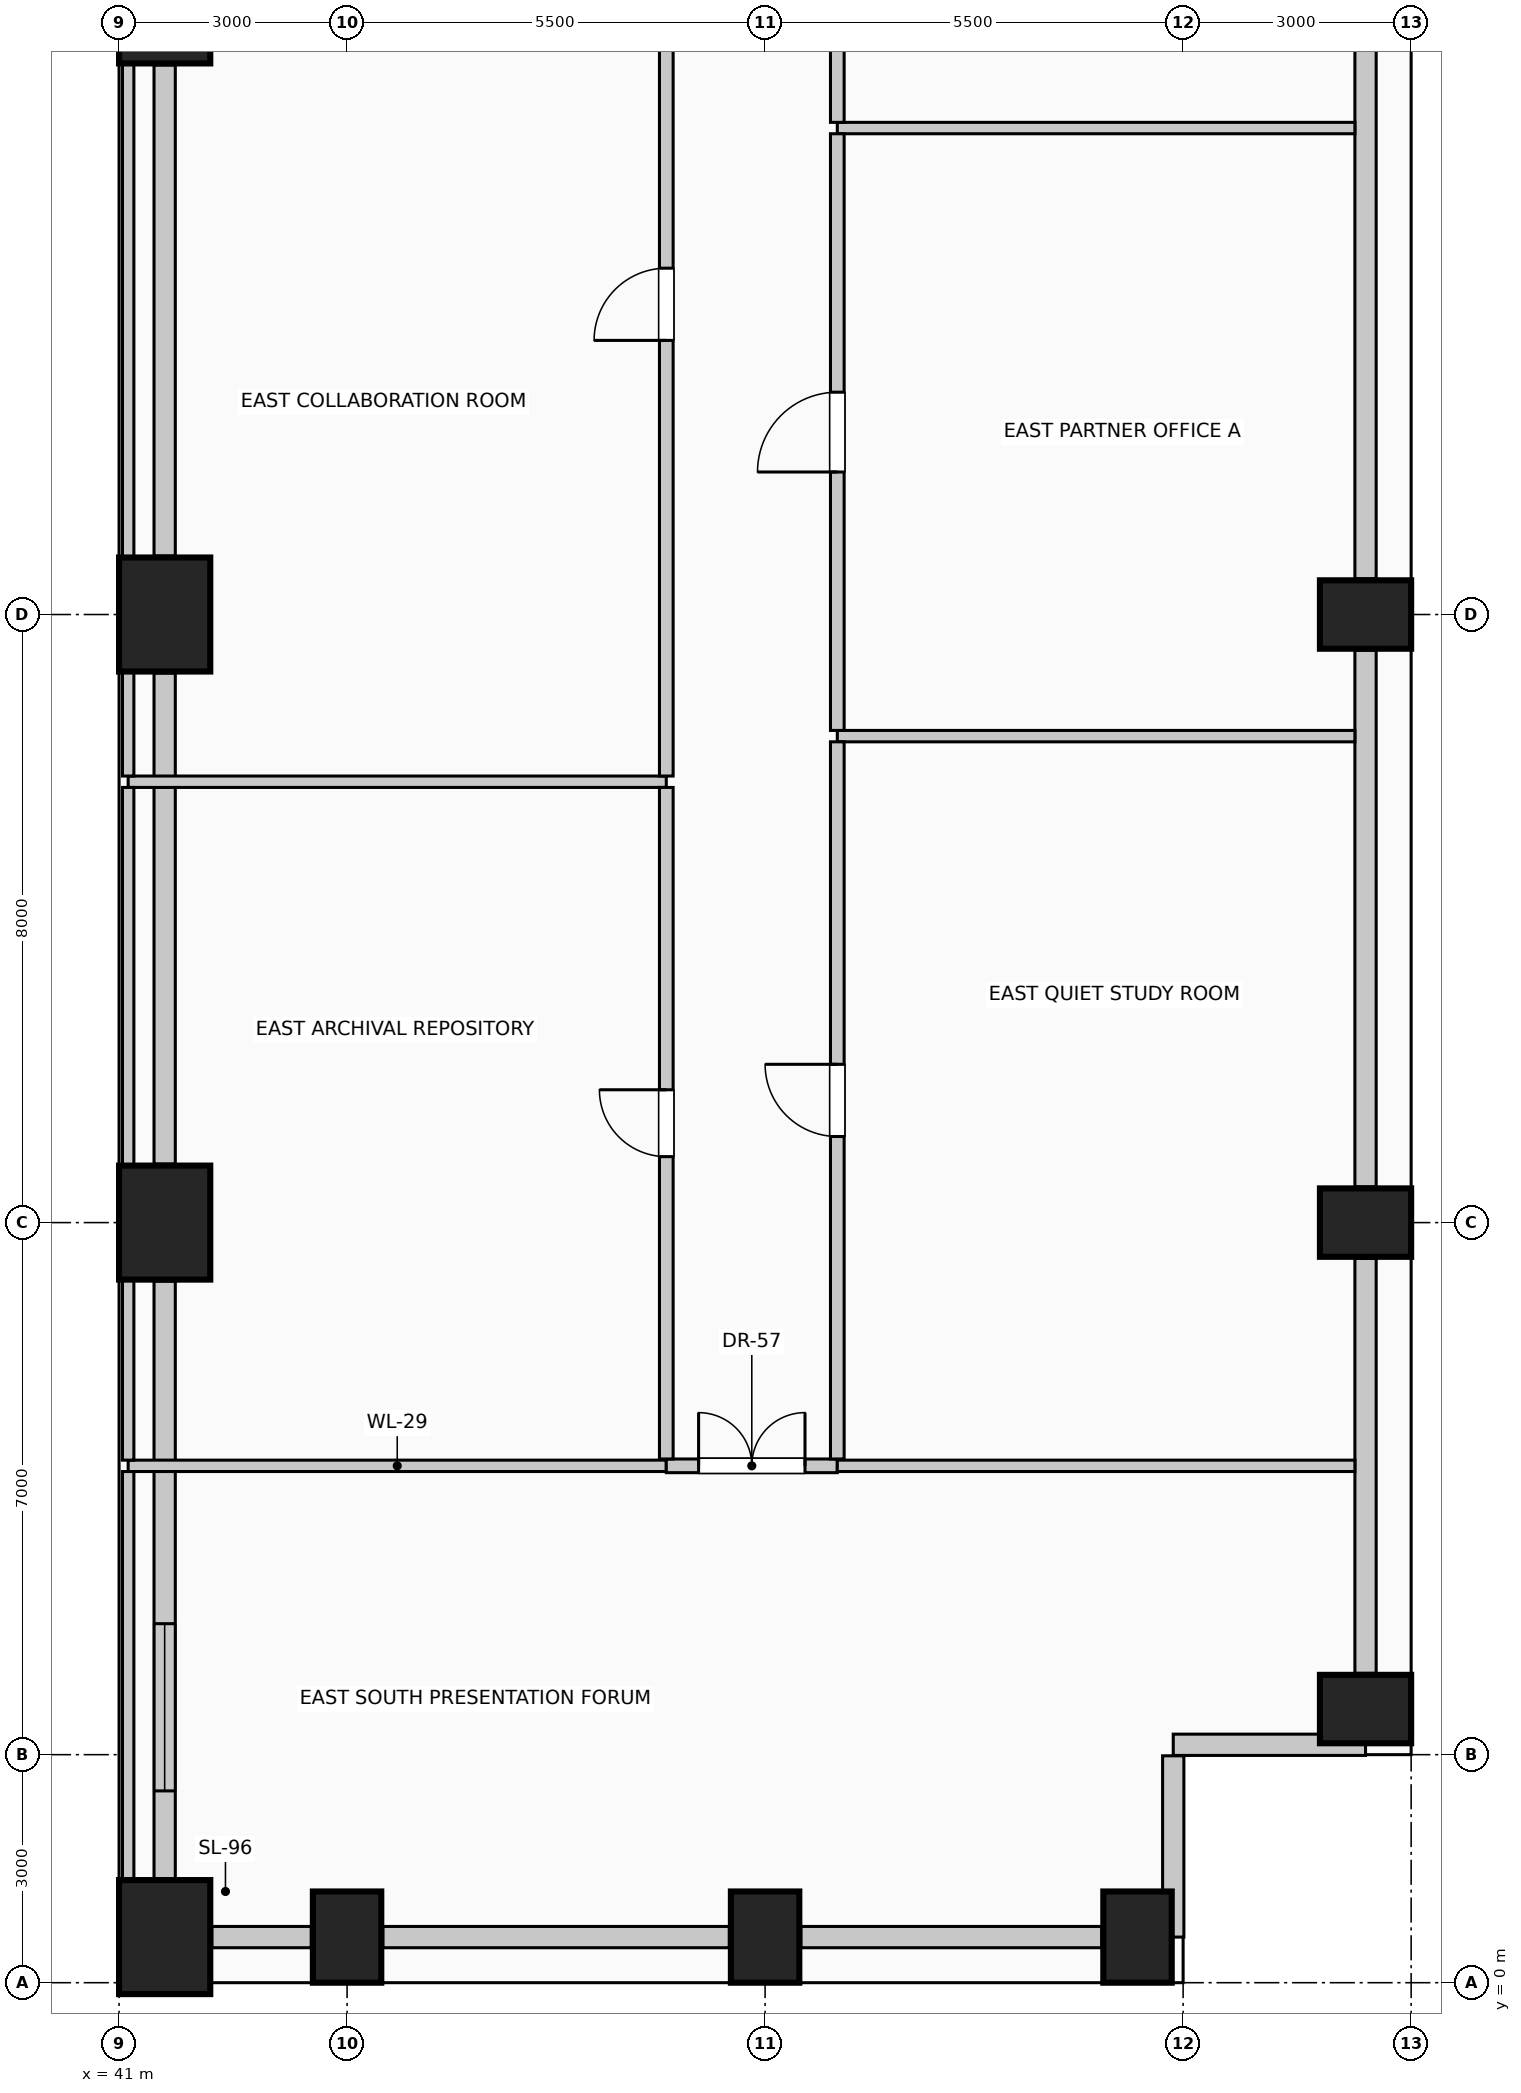
"""IFC4 building model, lengths in metres.
Left out: names, types, materials, properties, quantities, classifications, styles, units other than length and angle.
Written with IfcOpenShell. Run it as: python <this file> out.ifc"""

import sys

from ifc_helpers import new_model, si_unit, direction, frame, frame_2d, origin, origin_2d, place, context, subcontext, project, spatial, rectangle, extrude, element, fill, save


model = new_model("IFC4")
c1 = context("Model", 3, precision=1e-05, world=origin(), true_north=direction((0.0, 1.0)))
c2 = subcontext(c1, "Body", "Model", "MODEL_VIEW")
j1 = project(units=[si_unit("LENGTHUNIT", "METRE"), si_unit("PLANEANGLEUNIT", "RADIAN")], contexts=[c1])
p1 = place(None, origin())
s1 = spatial("IfcSite", under=j1, at=p1, CompositionType="ELEMENT")
p2 = place(p1, origin())
s2 = spatial("IfcBuilding", under=s1, at=p2, CompositionType="ELEMENT")
p3 = place(p2, frame((0.0, 0.0, 34.6)))
s3 = spatial("IfcBuildingStorey", under=s2, at=p3, CompositionType="ELEMENT", Elevation=34.6)
p4 = place(p3, frame((41.6, 0.6, 0.0), z_axis=(0.0, 0.0, 1.0), x_axis=(1.0, 0.0, 0.0)))
e1 = element("IfcColumn", 1, at=p4, inside=s3, PredefinedType="COLUMN", context=c2, shape_type="SweptSolid", body=[
    extrude(rectangle(XDim=1.2, YDim=1.5, at=origin_2d()), origin(), (0.0, 0.0, 1.0), 4.0),
])
for number, where, z_axis, x_axis in (
    (2, (44.0, 0.6, 0.0), (0.0, 0.0, 1.0), (1.0, 0.0, 0.0)),
    (3, (49.5, 0.6, 0.0), (0.0, 0.0, 1.0), (1.0, 0.0, 0.0)),
    (4, (54.4, 0.6, 0.0), (0.0, 0.0, 1.0), (1.0, 0.0, 0.0)),
    (5, (57.4, 3.6, 0.0), (0.0, 0.0, 1.0), (0.0, 1.0, 0.0)),
    (6, (57.4, 10.0, 0.0), (0.0, 0.0, 1.0), (0.0, 1.0, 0.0)),
    (7, (57.4, 18.0, 0.0), (0.0, 0.0, 1.0), (0.0, 1.0, 0.0)),
):
    element("IfcColumn", number, at=place(p3, frame(where, z_axis=z_axis, x_axis=x_axis)), inside=s3, PredefinedType="COLUMN", context=c2, shape_type="SweptSolid", body=[
        extrude(rectangle(XDim=0.9, YDim=1.2, at=origin_2d()), origin(), (0.0, 0.0, 1.0), 4.0),
    ])
for number, where, z_axis, x_axis in (
    (8, (41.6, 10.0, 0.0), (0.0, 0.0, 1.0), (1.0, 0.0, 0.0)),
    (9, (41.6, 18.0, 0.0), (0.0, 0.0, 1.0), (1.0, 0.0, 0.0)),
    (10, (41.6, 26.0, 0.0), (0.0, 0.0, 1.0), (1.0, 0.0, 0.0)),
):
    element("IfcColumn", number, at=place(p3, frame(where, z_axis=z_axis, x_axis=x_axis)), inside=s3, PredefinedType="COLUMN", context=c2, shape_type="SweptSolid", body=[
        extrude(rectangle(XDim=1.2, YDim=1.5, at=origin_2d()), origin(), (0.0, 0.0, 1.0), 4.0),
    ])
p5 = place(p3, frame((43.53, 0.6, 0.0), z_axis=(0.0, 0.0, 1.0), x_axis=(-1.0, 0.0, 0.0)))
e11 = element("IfcWall", 11, at=p5, inside=s3, PredefinedType="SOLIDWALL", context=c2, shape_type="SweptSolid", body=[
    extrude(rectangle(XDim=1.31, YDim=0.28, at=frame_2d((0.655, 0.0))), origin(), (0.0, 0.0, 1.0), 2.85),
])
p6 = place(p3, frame((49.03, 0.6, 0.0), z_axis=(0.0, 0.0, 1.0), x_axis=(-1.0, 0.0, 0.0)))
e12 = element("IfcWall", 12, at=p6, inside=s3, PredefinedType="SOLIDWALL", context=c2, shape_type="SweptSolid", body=[
    extrude(rectangle(XDim=4.56, YDim=0.28, at=frame_2d((2.28, 0.0))), origin(), (0.0, 0.0, 1.0), 2.85),
])
p7 = place(p3, frame((53.93, 0.6, 0.0), z_axis=(0.0, 0.0, 1.0), x_axis=(-1.0, 0.0, 0.0)))
e13 = element("IfcWall", 13, at=p7, inside=s3, PredefinedType="SOLIDWALL", context=c2, shape_type="SweptSolid", body=[
    extrude(rectangle(XDim=3.96, YDim=0.28, at=frame_2d((1.98, 0.0))), origin(), (0.0, 0.0, 1.0), 2.85),
])
p8 = place(p3, frame((57.4, 9.53, 0.0), z_axis=(0.0, 0.0, 1.0), x_axis=(0.0, -1.0, 0.0)))
e14 = element("IfcWall", 14, at=p8, inside=s3, PredefinedType="SOLIDWALL", context=c2, shape_type="SweptSolid", body=[
    extrude(rectangle(XDim=5.46, YDim=0.28, at=frame_2d((2.73, 0.0))), origin(), (0.0, 0.0, 1.0), 2.85),
])
for number, where, z_axis, x_axis in (
    (15, (57.4, 17.53, 0.0), (0.0, 0.0, 1.0), (0.0, -1.0, 0.0)),
    (16, (57.4, 25.53, 0.0), (0.0, 0.0, 1.0), (0.0, -1.0, 0.0)),
):
    element("IfcWall", number, at=place(p3, frame(where, z_axis=z_axis, x_axis=x_axis)), inside=s3, PredefinedType="SOLIDWALL", context=c2, shape_type="SweptSolid", body=[
        extrude(rectangle(XDim=7.06, YDim=0.28, at=frame_2d((3.53, 0.0))), origin(), (0.0, 0.0, 1.0), 2.85),
    ])
p9 = place(p3, frame((57.4, 3.13, 0.0), z_axis=(0.0, 0.0, 1.0), x_axis=(-1.0, 0.0, 0.0)))
e17 = element("IfcWall", 17, at=p9, inside=s3, PredefinedType="SOLIDWALL", context=c2, shape_type="SweptSolid", body=[
    extrude(rectangle(XDim=2.53, YDim=0.28, at=frame_2d((1.265, 0.0))), origin(), (0.0, 0.0, 1.0), 3.7),
])
p10 = place(p3, frame((54.87, 2.985, 0.0), z_axis=(0.0, 0.0, 1.0), x_axis=(0.0, -1.0, 0.0)))
e18 = element("IfcWall", 18, at=p10, inside=s3, PredefinedType="SOLIDWALL", context=c2, shape_type="SweptSolid", body=[
    extrude(rectangle(XDim=2.385, YDim=0.28, at=frame_2d((1.192, 0.0))), origin(), (0.0, 0.0, 1.0), 3.7),
])
p11 = place(p3, frame((41.6, 1.37, 0.0), z_axis=(0.0, 0.0, 1.0), x_axis=(0.0, 1.0, 0.0)))
e19 = element("IfcWall", 19, at=p11, inside=s3, PredefinedType="SOLIDWALL", context=c2, shape_type="SweptSolid", body=[
    extrude(rectangle(XDim=7.86, YDim=0.28, at=frame_2d((3.93, 0.0))), origin(), (0.0, 0.0, 1.0), 3.0),
])
p12 = place(p11, frame((1.153, 0.0, 0.42)))
e20 = element("IfcOpeningElement", 20, at=p12, cuts=e19, PredefinedType="OPENING", context=c2, shape_type="SweptSolid", body=[
    extrude(rectangle(XDim=2.2, YDim=1.95, at=frame_2d((1.1, 0.975))), frame((0.0, 0.15, 0.0), z_axis=(0.0, -1.0, 0.0), x_axis=(1.0, 0.0, 0.0)), (0.0, 0.0, 1.0), 0.3),
])
for number, where, z_axis, x_axis in (
    (21, (41.6, 10.77, 0.0), (0.0, 0.0, 1.0), (0.0, 1.0, 0.0)),
    (22, (41.6, 18.77, 0.0), (0.0, 0.0, 1.0), (0.0, 1.0, 0.0)),
):
    element("IfcWall", number, at=place(p3, frame(where, z_axis=z_axis, x_axis=x_axis)), inside=s3, PredefinedType="SOLIDWALL", context=c2, shape_type="SweptSolid", body=[
        extrude(rectangle(XDim=6.46, YDim=0.28, at=frame_2d((3.23, 0.0))), origin(), (0.0, 0.0, 1.0), 3.0),
    ])
p13 = place(p3, frame((41.12, 6.8, 0.0), z_axis=(0.0, 0.0, 1.0), x_axis=(1.0, 0.0, 0.0)))
e23 = element("IfcWall", 23, at=p13, inside=s3, PredefinedType="PARTITIONING", context=c2, shape_type="SweptSolid", body=[
    extrude(rectangle(XDim=7.08, YDim=0.15, at=frame_2d((3.54, 0.0))), origin(), (0.0, 0.0, 1.0), 3.095),
])
p14 = place(p3, frame((48.2, 6.8, 0.0), z_axis=(0.0, 0.0, 1.0), x_axis=(1.0, 0.0, 0.0)))
e24 = element("IfcWall", 24, at=p14, inside=s3, PredefinedType="PARTITIONING", context=c2, shape_type="SweptSolid", body=[
    extrude(rectangle(XDim=2.25, YDim=0.18, at=frame_2d((1.125, 0.0))), origin(), (0.0, 0.0, 1.0), 3.095),
])
p15 = place(p14, frame((0.425, 0.0, 0.0)))
e25 = element("IfcOpeningElement", 25, at=p15, cuts=e24, PredefinedType="OPENING", context=c2, shape_type="SweptSolid", body=[
    extrude(rectangle(XDim=1.4, YDim=2.2, at=frame_2d((0.7, 1.1))), frame((0.0, 0.1, 0.0), z_axis=(0.0, -1.0, 0.0), x_axis=(1.0, 0.0, 0.0)), (0.0, 0.0, 1.0), 0.2),
])
p16 = place(p3, frame((50.45, 6.8, 0.0), z_axis=(0.0, 0.0, 1.0), x_axis=(1.0, 0.0, 0.0)))
e26 = element("IfcWall", 26, at=p16, inside=s3, PredefinedType="PARTITIONING", context=c2, shape_type="SweptSolid", body=[
    extrude(rectangle(XDim=6.81, YDim=0.15, at=frame_2d((3.405, 0.0))), origin(), (0.0, 0.0, 1.0), 3.095),
])
p17 = place(p3, frame((41.12, 15.8, 0.0), z_axis=(0.0, 0.0, 1.0), x_axis=(1.0, 0.0, 0.0)))
e27 = element("IfcWall", 27, at=p17, inside=s3, PredefinedType="PARTITIONING", context=c2, shape_type="SweptSolid", body=[
    extrude(rectangle(XDim=7.08, YDim=0.15, at=frame_2d((3.54, 0.0))), origin(), (0.0, 0.0, 1.0), 3.7),
])
for number, where, z_axis, x_axis in (
    (28, (50.45, 16.4, 0.0), (0.0, 0.0, 1.0), (1.0, 0.0, 0.0)),
    (29, (50.45, 24.4, 0.0), (0.0, 0.0, 1.0), (1.0, 0.0, 0.0)),
):
    element("IfcWall", number, at=place(p3, frame(where, z_axis=z_axis, x_axis=x_axis)), inside=s3, PredefinedType="PARTITIONING", context=c2, shape_type="SweptSolid", body=[
        extrude(rectangle(XDim=6.81, YDim=0.15, at=frame_2d((3.405, 0.0))), origin(), (0.0, 0.0, 1.0), 3.7),
    ])
p18 = place(p3, frame((41.12, 1.35, 0.0), z_axis=(0.0, 0.0, 1.0), x_axis=(0.0, 1.0, 0.0)))
e30 = element("IfcWall", 30, at=p18, inside=s3, PredefinedType="PARTITIONING", context=c2, shape_type="SweptSolid", body=[
    extrude(rectangle(XDim=5.375, YDim=0.15, at=frame_2d((2.688, 0.0))), origin(), (0.0, 0.0, 1.0), 3.7),
])
p19 = place(p3, frame((41.12, 6.875, 0.0), z_axis=(0.0, 0.0, 1.0), x_axis=(0.0, 1.0, 0.0)))
e31 = element("IfcWall", 31, at=p19, inside=s3, PredefinedType="PARTITIONING", context=c2, shape_type="SweptSolid", body=[
    extrude(rectangle(XDim=2.375, YDim=0.15, at=frame_2d((1.188, 0.0))), origin(), (0.0, 0.0, 1.0), 3.7),
])
p20 = place(p3, frame((41.12, 10.75, 0.0), z_axis=(0.0, 0.0, 1.0), x_axis=(0.0, 1.0, 0.0)))
e32 = element("IfcWall", 32, at=p20, inside=s3, PredefinedType="PARTITIONING", context=c2, shape_type="SweptSolid", body=[
    extrude(rectangle(XDim=4.975, YDim=0.15, at=frame_2d((2.488, 0.0))), origin(), (0.0, 0.0, 1.0), 3.7),
])
p21 = place(p3, frame((41.12, 15.875, 0.0), z_axis=(0.0, 0.0, 1.0), x_axis=(0.0, 1.0, 0.0)))
e33 = element("IfcWall", 33, at=p21, inside=s3, PredefinedType="PARTITIONING", context=c2, shape_type="SweptSolid", body=[
    extrude(rectangle(XDim=1.375, YDim=0.15, at=frame_2d((0.688, 0.0))), origin(), (0.0, 0.0, 1.0), 3.7),
])
p22 = place(p3, frame((41.12, 18.75, 0.0), z_axis=(0.0, 0.0, 1.0), x_axis=(0.0, 1.0, 0.0)))
e34 = element("IfcWall", 34, at=p22, inside=s3, PredefinedType="PARTITIONING", context=c2, shape_type="SweptSolid", body=[
    extrude(rectangle(XDim=6.5, YDim=0.15, at=frame_2d((3.25, 0.0))), origin(), (0.0, 0.0, 1.0), 3.7),
])
p23 = place(p3, frame((48.2, 6.89, 0.0), z_axis=(0.0, 0.0, 1.0), x_axis=(0.0, 1.0, 0.0)))
e35 = element("IfcWall", 35, at=p23, inside=s3, PredefinedType="PARTITIONING", context=c2, shape_type="SweptSolid", body=[
    extrude(rectangle(XDim=8.835, YDim=0.18, at=frame_2d((4.417, 0.0))), origin(), (0.0, 0.0, 1.0), 3.7),
])
p24 = place(p23, frame((3.978, 0.0, 0.0)))
e36 = element("IfcOpeningElement", 36, at=p24, cuts=e35, PredefinedType="OPENING", context=c2, shape_type="SweptSolid", body=[
    extrude(rectangle(XDim=0.88, YDim=2.1, at=frame_2d((0.44, 1.05))), frame((0.0, 0.1, 0.0), z_axis=(0.0, -1.0, 0.0), x_axis=(1.0, 0.0, 0.0)), (0.0, 0.0, 1.0), 0.2),
])
p25 = place(p3, frame((48.2, 15.875, 0.0), z_axis=(0.0, 0.0, 1.0), x_axis=(0.0, 1.0, 0.0)))
e37 = element("IfcWall", 37, at=p25, inside=s3, PredefinedType="PARTITIONING", context=c2, shape_type="SweptSolid", body=[
    extrude(rectangle(XDim=12.413, YDim=0.18, at=frame_2d((6.206, 0.0))), origin(), (0.0, 0.0, 1.0), 3.7),
])
p26 = place(p25, frame((5.731, 0.0, 0.0)))
e38 = element("IfcOpeningElement", 38, at=p26, cuts=e37, PredefinedType="OPENING", context=c2, shape_type="SweptSolid", body=[
    extrude(rectangle(XDim=0.95, YDim=2.15, at=frame_2d((0.475, 1.075))), frame((0.0, 0.1, 0.0), z_axis=(0.0, -1.0, 0.0), x_axis=(1.0, 0.0, 0.0)), (0.0, 0.0, 1.0), 0.2),
])
p27 = place(p3, frame((50.45, 6.89, 0.0), z_axis=(0.0, 0.0, 1.0), x_axis=(0.0, 1.0, 0.0)))
e39 = element("IfcWall", 39, at=p27, inside=s3, PredefinedType="PARTITIONING", context=c2, shape_type="SweptSolid", body=[
    extrude(rectangle(XDim=9.435, YDim=0.18, at=frame_2d((4.718, 0.0))), origin(), (0.0, 0.0, 1.0), 3.7),
])
p28 = place(p27, frame((4.242, 0.0, 0.0)))
e40 = element("IfcOpeningElement", 40, at=p28, cuts=e39, PredefinedType="OPENING", context=c2, shape_type="SweptSolid", body=[
    extrude(rectangle(XDim=0.95, YDim=2.15, at=frame_2d((0.475, 1.075))), frame((0.0, 0.1, 0.0), z_axis=(0.0, -1.0, 0.0), x_axis=(1.0, 0.0, 0.0)), (0.0, 0.0, 1.0), 0.2),
])
p29 = place(p3, frame((50.45, 16.475, 0.0), z_axis=(0.0, 0.0, 1.0), x_axis=(0.0, 1.0, 0.0)))
e41 = element("IfcWall", 41, at=p29, inside=s3, PredefinedType="PARTITIONING", context=c2, shape_type="SweptSolid", body=[
    extrude(rectangle(XDim=7.85, YDim=0.18, at=frame_2d((3.925, 0.0))), origin(), (0.0, 0.0, 1.0), 3.7),
])
p30 = place(p29, frame((3.4, 0.0, 0.0)))
e42 = element("IfcOpeningElement", 42, at=p30, cuts=e41, PredefinedType="OPENING", context=c2, shape_type="SweptSolid", body=[
    extrude(rectangle(XDim=1.05, YDim=2.15, at=frame_2d((0.525, 1.075))), frame((0.0, 0.1, 0.0), z_axis=(0.0, -1.0, 0.0), x_axis=(1.0, 0.0, 0.0)), (0.0, 0.0, 1.0), 0.2),
])
p31 = place(p3, frame((50.45, 24.475, 0.0), z_axis=(0.0, 0.0, 1.0), x_axis=(0.0, 1.0, 0.0)))
e43 = element("IfcWall", 43, at=p31, inside=s3, PredefinedType="PARTITIONING", context=c2, shape_type="SweptSolid", body=[
    extrude(rectangle(XDim=7.8, YDim=0.18, at=frame_2d((3.9, 0.0))), origin(), (0.0, 0.0, 1.0), 3.7),
])
p32 = place(p12, origin())
e44 = element("IfcWindow", 44, at=p32, inside=s3, PartitioningType="SINGLE_PANEL", PredefinedType="WINDOW", context=c2, shape_type="SweptSolid", body=[
    extrude(rectangle(XDim=2.2, YDim=1.95, at=frame_2d((1.1, 0.975))), frame((0.0, 0.03, 0.0), z_axis=(0.0, -1.0, 0.0), x_axis=(1.0, 0.0, 0.0)), (0.0, 0.0, 1.0), 0.06),
])
fill(e20, e44)
p33 = place(p15, origin())
e45 = element("IfcDoor", 45, at=p33, inside=s3, OperationType="DOUBLE_DOOR_SINGLE_SWING", PredefinedType="DOOR", context=c2, shape_type="SweptSolid", body=[
    extrude(rectangle(XDim=1.4, YDim=2.2, at=frame_2d((0.7, 1.1))), frame((0.0, 0.025, 0.0), z_axis=(0.0, -1.0, 0.0), x_axis=(1.0, 0.0, 0.0)), (0.0, 0.0, 1.0), 0.05),
])
fill(e25, e45)
p34 = place(p24, origin())
e46 = element("IfcDoor", 46, at=p34, inside=s3, OperationType="SINGLE_SWING_RIGHT", PredefinedType="DOOR", context=c2, shape_type="SweptSolid", body=[
    extrude(rectangle(XDim=0.88, YDim=2.1, at=frame_2d((0.44, 1.05))), frame((0.0, 0.025, 0.0), z_axis=(0.0, -1.0, 0.0), x_axis=(1.0, 0.0, 0.0)), (0.0, 0.0, 1.0), 0.05),
])
fill(e36, e46)
p35 = place(p26, origin())
e47 = element("IfcDoor", 47, at=p35, inside=s3, OperationType="SINGLE_SWING_LEFT", PredefinedType="DOOR", context=c2, shape_type="SweptSolid", body=[
    extrude(rectangle(XDim=0.95, YDim=2.15, at=frame_2d((0.475, 1.075))), frame((0.0, 0.025, 0.0), z_axis=(0.0, -1.0, 0.0), x_axis=(1.0, 0.0, 0.0)), (0.0, 0.0, 1.0), 0.05),
])
fill(e38, e47)
p36 = place(p28, origin())
e48 = element("IfcDoor", 48, at=p36, inside=s3, OperationType="SINGLE_SWING_RIGHT", PredefinedType="DOOR", context=c2, shape_type="SweptSolid", body=[
    extrude(rectangle(XDim=0.95, YDim=2.15, at=frame_2d((0.475, 1.075))), frame((0.0, 0.025, 0.0), z_axis=(0.0, -1.0, 0.0), x_axis=(1.0, 0.0, 0.0)), (0.0, 0.0, 1.0), 0.05),
])
fill(e40, e48)
p37 = place(p30, origin())
e49 = element("IfcDoor", 49, at=p37, inside=s3, OperationType="SINGLE_SWING_LEFT", PredefinedType="DOOR", context=c2, shape_type="SweptSolid", body=[
    extrude(rectangle(XDim=1.05, YDim=2.15, at=frame_2d((0.525, 1.075))), frame((0.0, 0.025, 0.0), z_axis=(0.0, -1.0, 0.0), x_axis=(1.0, 0.0, 0.0)), (0.0, 0.0, 1.0), 0.05),
])
fill(e42, e49)
save(model, sys.argv[1])
